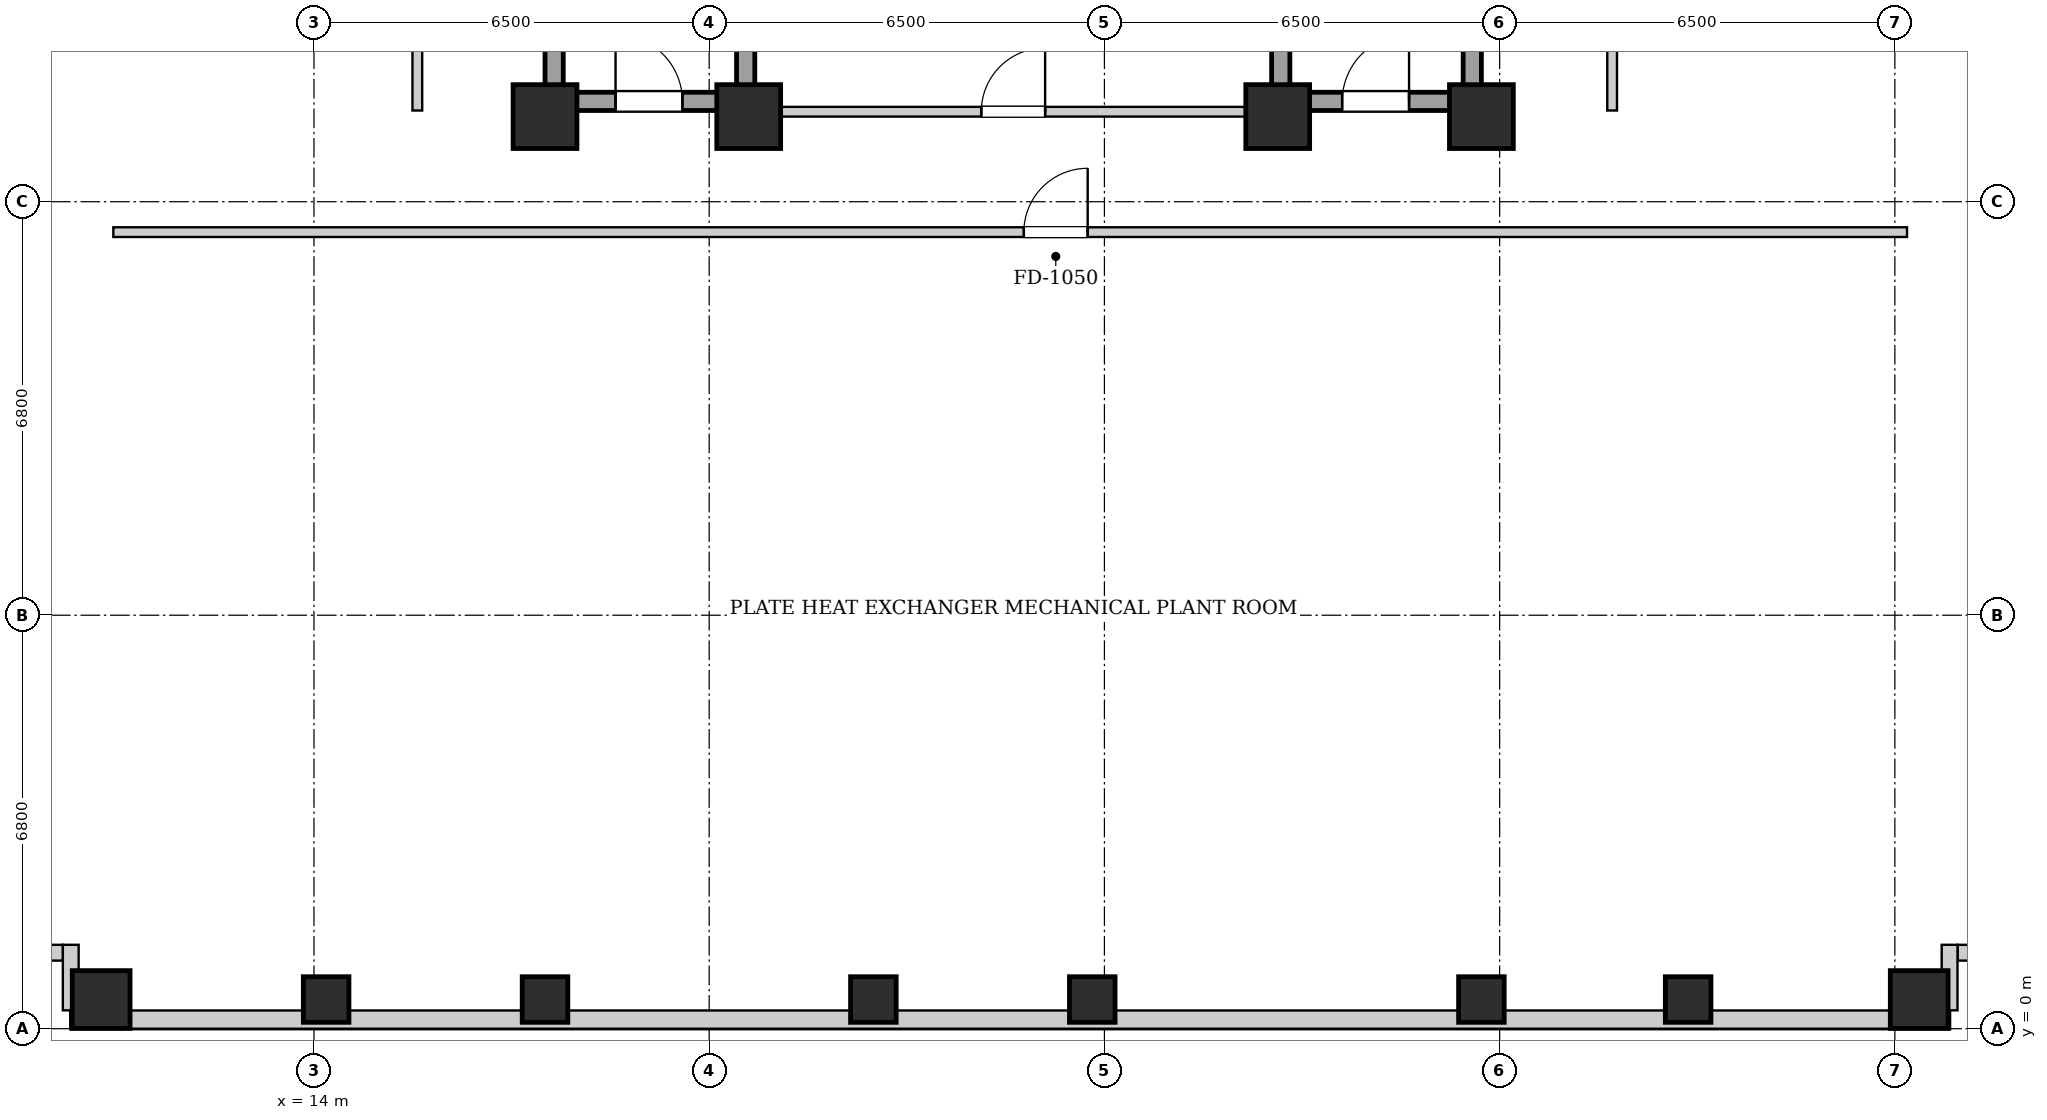
"""IFC4 building model, lengths in metres.
Left out: names, types, materials, properties, quantities, classifications, styles, units other than length and angle.
Written with IfcOpenShell. Run it as: python <this file> out.ifc"""

import sys

from ifc_helpers import new_model, si_unit, direction, frame, frame_2d, origin, origin_2d, place, context, subcontext, project, spatial, rectangle, extrude, element, fill, save


model = new_model("IFC4")
c1 = context("Model", 3, precision=1e-05, world=origin(), true_north=direction((0.0, 1.0)))
c2 = subcontext(c1, "Body", "Model", "MODEL_VIEW")
j1 = project(units=[si_unit("LENGTHUNIT", "METRE"), si_unit("PLANEANGLEUNIT", "RADIAN")], contexts=[c1])
p1 = place(None, origin())
s1 = spatial("IfcSite", under=j1, at=p1, CompositionType="ELEMENT")
p2 = place(p1, origin())
s2 = spatial("IfcBuilding", under=s1, at=p2, CompositionType="ELEMENT")
p3 = place(p2, frame((0.0, 0.0, 119.9)))
s3 = spatial("IfcBuildingStorey", under=s2, at=p3, CompositionType="ELEMENT", Elevation=119.9)
p4 = place(p3, frame((10.5, 0.48, 0.0), z_axis=(0.0, 0.0, 1.0), x_axis=(1.0, 0.0, 0.0)))
e1 = element("IfcColumn", 1, at=p4, inside=s3, PredefinedType="COLUMN", context=c2, shape_type="SweptSolid", body=[
    extrude(rectangle(XDim=0.95, YDim=0.95, at=origin_2d()), origin(), (0.0, 0.0, 1.0), 4.5),
])
for number, where, z_axis, x_axis in (
    (2, (14.2, 0.48, 0.0), (0.0, 0.0, 1.0), (1.0, 0.0, 0.0)),
    (3, (17.8, 0.48, 0.0), (0.0, 0.0, 1.0), (1.0, 0.0, 0.0)),
    (4, (23.2, 0.48, 0.0), (0.0, 0.0, 1.0), (1.0, 0.0, 0.0)),
    (5, (26.8, 0.48, 0.0), (0.0, 0.0, 1.0), (1.0, 0.0, 0.0)),
    (6, (33.2, 0.48, 0.0), (0.0, 0.0, 1.0), (1.0, 0.0, 0.0)),
    (7, (36.6, 0.48, 0.0), (0.0, 0.0, 1.0), (1.0, 0.0, 0.0)),
):
    element("IfcColumn", number, at=place(p3, frame(where, z_axis=z_axis, x_axis=x_axis)), inside=s3, PredefinedType="COLUMN", context=c2, shape_type="SweptSolid", body=[
        extrude(rectangle(XDim=0.75, YDim=0.75, at=origin_2d()), origin(), (0.0, 0.0, 1.0), 4.5),
    ])
p5 = place(p3, frame((40.4, 0.48, 0.0), z_axis=(0.0, 0.0, 1.0), x_axis=(1.0, 0.0, 0.0)))
e8 = element("IfcColumn", 8, at=p5, inside=s3, PredefinedType="COLUMN", context=c2, shape_type="SweptSolid", body=[
    extrude(rectangle(XDim=0.95, YDim=0.95, at=origin_2d()), origin(), (0.0, 0.0, 1.0), 4.5),
])
for number, where, z_axis, x_axis in (
    (9, (17.8, 15.0, 0.0), (0.0, 0.0, 1.0), (1.0, 0.0, 0.0)),
    (10, (21.15, 15.0, 0.0), (0.0, 0.0, 1.0), (1.0, 0.0, 0.0)),
    (11, (29.85, 15.0, 0.0), (0.0, 0.0, 1.0), (1.0, 0.0, 0.0)),
    (12, (33.2, 15.0, 0.0), (0.0, 0.0, 1.0), (1.0, 0.0, 0.0)),
):
    element("IfcColumn", number, at=place(p3, frame(where, z_axis=z_axis, x_axis=x_axis)), inside=s3, PredefinedType="COLUMN", context=c2, shape_type="SweptSolid", body=[
        extrude(rectangle(XDim=1.05, YDim=1.05, at=origin_2d()), origin(), (0.0, 0.0, 1.0), 4.5),
    ])
p6 = place(p3, frame((40.9, 0.15, 0.0), z_axis=(0.0, 0.0, 1.0), x_axis=(-1.0, 0.0, 0.0)))
e13 = element("IfcWall", 13, at=p6, inside=s3, PredefinedType="SOLIDWALL", context=c2, shape_type="SweptSolid", body=[
    extrude(rectangle(XDim=30.9, YDim=0.3, at=frame_2d((15.45, 0.0))), origin(), (0.0, 0.0, 1.0), 1.965),
])
p7 = place(p3, frame((42.018, 1.25, 0.0), z_axis=(0.0, 0.0, 1.0), x_axis=(-1.0, 0.0, 0.0)))
e14 = element("IfcWall", 14, at=p7, inside=s3, PredefinedType="SOLIDWALL", context=c2, shape_type="SweptSolid", body=[
    extrude(rectangle(XDim=0.986, YDim=0.26, at=frame_2d((0.493, 0.0))), origin(), (0.0, 0.0, 1.0), 4.18),
])
for number, where, z_axis, x_axis in (
    (15, (40.9, 1.38, 0.0), (0.0, 0.0, 1.0), (0.0, -1.0, 0.0)),
    (16, (10.0, 0.302, 0.0), (0.0, 0.0, 1.0), (0.0, 1.0, 0.0)),
):
    element("IfcWall", number, at=place(p3, frame(where, z_axis=z_axis, x_axis=x_axis)), inside=s3, PredefinedType="SOLIDWALL", context=c2, shape_type="SweptSolid", body=[
        extrude(rectangle(XDim=1.078, YDim=0.26, at=frame_2d((0.539, 0.0))), origin(), (0.0, 0.0, 1.0), 4.18),
    ])
p8 = place(p3, frame((9.868, 1.25, 0.0), z_axis=(0.0, 0.0, 1.0), x_axis=(-1.0, 0.0, 0.0)))
e17 = element("IfcWall", 17, at=p8, inside=s3, PredefinedType="SOLIDWALL", context=c2, shape_type="SweptSolid", body=[
    extrude(rectangle(XDim=1.248, YDim=0.26, at=frame_2d((0.624, 0.0))), origin(), (0.0, 0.0, 1.0), 4.18),
])
for number, where, z_axis, x_axis in (
    (18, (17.95, 15.1, 0.0), (0.0, 0.0, 1.0), (0.0, 1.0, 0.0)),
    (19, (21.1, 15.1, 0.0), (0.0, 0.0, 1.0), (0.0, 1.0, 0.0)),
):
    element("IfcWall", number, at=place(p3, frame(where, z_axis=z_axis, x_axis=x_axis)), inside=s3, PredefinedType="SHEAR", context=c2, shape_type="SweptSolid", body=[
        extrude(rectangle(XDim=9.0, YDim=0.3, at=frame_2d((4.5, 0.0))), origin(), (0.0, 0.0, 1.0), 4.18),
    ])
p9 = place(p3, frame((18.1, 15.25, 0.0), z_axis=(0.0, 0.0, 1.0), x_axis=(1.0, 0.0, 0.0)))
e20 = element("IfcWall", 20, at=p9, inside=s3, PredefinedType="SHEAR", context=c2, shape_type="SweptSolid", body=[
    extrude(rectangle(XDim=2.85, YDim=0.3, at=frame_2d((1.425, 0.0))), origin(), (0.0, 0.0, 1.0), 4.18),
])
p10 = place(p9, frame((0.86, 0.0, 0.0)))
e21 = element("IfcOpeningElement", 21, at=p10, cuts=e20, PredefinedType="OPENING", context=c2, shape_type="SweptSolid", body=[
    extrude(rectangle(XDim=1.1, YDim=2.05, at=frame_2d((0.55, 1.025))), frame((0.0, 0.16, 0.0), z_axis=(0.0, -1.0, 0.0), x_axis=(1.0, 0.0, 0.0)), (0.0, 0.0, 1.0), 0.32),
])
for number, where, z_axis, x_axis in (
    (22, (29.9, 15.1, 0.0), (0.0, 0.0, 1.0), (0.0, 1.0, 0.0)),
    (23, (33.05, 15.1, 0.0), (0.0, 0.0, 1.0), (0.0, 1.0, 0.0)),
):
    element("IfcWall", number, at=place(p3, frame(where, z_axis=z_axis, x_axis=x_axis)), inside=s3, PredefinedType="SHEAR", context=c2, shape_type="SweptSolid", body=[
        extrude(rectangle(XDim=9.0, YDim=0.3, at=frame_2d((4.5, 0.0))), origin(), (0.0, 0.0, 1.0), 4.18),
    ])
p11 = place(p3, frame((30.05, 15.25, 0.0), z_axis=(0.0, 0.0, 1.0), x_axis=(1.0, 0.0, 0.0)))
e24 = element("IfcWall", 24, at=p11, inside=s3, PredefinedType="SHEAR", context=c2, shape_type="SweptSolid", body=[
    extrude(rectangle(XDim=2.85, YDim=0.3, at=frame_2d((1.425, 0.0))), origin(), (0.0, 0.0, 1.0), 4.18),
])
p12 = place(p11, frame((0.86, 0.0, 0.0)))
e25 = element("IfcOpeningElement", 25, at=p12, cuts=e24, PredefinedType="OPENING", context=c2, shape_type="SweptSolid", body=[
    extrude(rectangle(XDim=1.1, YDim=2.05, at=frame_2d((0.55, 1.025))), frame((0.0, 0.16, 0.0), z_axis=(0.0, -1.0, 0.0), x_axis=(1.0, 0.0, 0.0)), (0.0, 0.0, 1.0), 0.32),
])
p13 = place(p3, frame((21.25, 15.08, 0.0), z_axis=(0.0, 0.0, 1.0), x_axis=(1.0, 0.0, 0.0)))
e26 = element("IfcWall", 26, at=p13, inside=s3, PredefinedType="PARTITIONING", context=c2, shape_type="SweptSolid", body=[
    extrude(rectangle(XDim=8.5, YDim=0.16, at=frame_2d((4.25, 0.0))), origin(), (0.0, 0.0, 1.0), 4.18),
])
p14 = place(p13, frame((3.725, 0.0, 0.0)))
e27 = element("IfcOpeningElement", 27, at=p14, cuts=e26, PredefinedType="OPENING", context=c2, shape_type="SweptSolid", body=[
    extrude(rectangle(XDim=1.05, YDim=2.05, at=frame_2d((0.525, 1.025))), frame((0.0, 0.09, 0.0), z_axis=(0.0, -1.0, 0.0), x_axis=(1.0, 0.0, 0.0)), (0.0, 0.0, 1.0), 0.18),
])
p15 = place(p3, frame((10.7, 13.1, 0.0), z_axis=(0.0, 0.0, 1.0), x_axis=(1.0, 0.0, 0.0)))
e28 = element("IfcWall", 28, at=p15, inside=s3, PredefinedType="PARTITIONING", context=c2, shape_type="SweptSolid", body=[
    extrude(rectangle(XDim=29.5, YDim=0.16, at=frame_2d((14.75, 0.0))), origin(), (0.0, 0.0, 1.0), 4.18),
])
p16 = place(p15, frame((14.975, 0.0, 0.0)))
e29 = element("IfcOpeningElement", 29, at=p16, cuts=e28, PredefinedType="OPENING", context=c2, shape_type="SweptSolid", body=[
    extrude(rectangle(XDim=1.05, YDim=2.05, at=frame_2d((0.525, 1.025))), frame((0.0, 0.09, 0.0), z_axis=(0.0, -1.0, 0.0), x_axis=(1.0, 0.0, 0.0)), (0.0, 0.0, 1.0), 0.18),
])
p17 = place(p3, frame((15.7, 15.1, 0.0), z_axis=(0.0, 0.0, 1.0), x_axis=(0.0, 1.0, 0.0)))
e30 = element("IfcWall", 30, at=p17, inside=s3, PredefinedType="PARTITIONING", context=c2, shape_type="SweptSolid", body=[
    extrude(rectangle(XDim=13.8, YDim=0.16, at=frame_2d((6.9, 0.0))), origin(), (0.0, 0.0, 1.0), 4.18),
])
p18 = place(p17, frame((6.475, 0.0, 0.0)))
e31 = element("IfcOpeningElement", 31, at=p18, cuts=e30, PredefinedType="OPENING", context=c2, shape_type="SweptSolid", body=[
    extrude(rectangle(XDim=1.05, YDim=2.05, at=frame_2d((0.525, 1.025))), frame((0.0, 0.09, 0.0), z_axis=(0.0, -1.0, 0.0), x_axis=(1.0, 0.0, 0.0)), (0.0, 0.0, 1.0), 0.18),
])
p19 = place(p3, frame((35.35, 15.1, 0.0), z_axis=(0.0, 0.0, 1.0), x_axis=(0.0, 1.0, 0.0)))
e32 = element("IfcWall", 32, at=p19, inside=s3, PredefinedType="PARTITIONING", context=c2, shape_type="SweptSolid", body=[
    extrude(rectangle(XDim=13.8, YDim=0.16, at=frame_2d((6.9, 0.0))), origin(), (0.0, 0.0, 1.0), 4.18),
])
p20 = place(p19, frame((6.475, 0.0, 0.0)))
e33 = element("IfcOpeningElement", 33, at=p20, cuts=e32, PredefinedType="OPENING", context=c2, shape_type="SweptSolid", body=[
    extrude(rectangle(XDim=1.05, YDim=2.05, at=frame_2d((0.525, 1.025))), frame((0.0, 0.09, 0.0), z_axis=(0.0, -1.0, 0.0), x_axis=(1.0, 0.0, 0.0)), (0.0, 0.0, 1.0), 0.18),
])
p21 = place(p10, origin())
e34 = element("IfcDoor", 34, at=p21, inside=s3, OperationType="SINGLE_SWING_LEFT", PredefinedType="DOOR", context=c2, shape_type="SweptSolid", body=[
    extrude(rectangle(XDim=1.1, YDim=2.05, at=frame_2d((0.55, 1.025))), frame((0.0, 0.025, 0.0), z_axis=(0.0, -1.0, 0.0), x_axis=(1.0, 0.0, 0.0)), (0.0, 0.0, 1.0), 0.05),
])
fill(e21, e34)
p22 = place(p12, origin())
e35 = element("IfcDoor", 35, at=p22, inside=s3, OperationType="SINGLE_SWING_RIGHT", PredefinedType="DOOR", context=c2, shape_type="SweptSolid", body=[
    extrude(rectangle(XDim=1.1, YDim=2.05, at=frame_2d((0.55, 1.025))), frame((0.0, 0.025, 0.0), z_axis=(0.0, -1.0, 0.0), x_axis=(1.0, 0.0, 0.0)), (0.0, 0.0, 1.0), 0.05),
])
fill(e25, e35)
p23 = place(p14, origin())
e36 = element("IfcDoor", 36, at=p23, inside=s3, OperationType="SINGLE_SWING_RIGHT", PredefinedType="DOOR", context=c2, shape_type="SweptSolid", body=[
    extrude(rectangle(XDim=1.05, YDim=2.05, at=frame_2d((0.525, 1.025))), frame((0.0, 0.025, 0.0), z_axis=(0.0, -1.0, 0.0), x_axis=(1.0, 0.0, 0.0)), (0.0, 0.0, 1.0), 0.05),
])
fill(e27, e36)
p24 = place(p16, origin())
e37 = element("IfcDoor", 37, at=p24, inside=s3, OperationType="SINGLE_SWING_RIGHT", PredefinedType="DOOR", context=c2, shape_type="SweptSolid", body=[
    extrude(rectangle(XDim=1.05, YDim=2.05, at=frame_2d((0.525, 1.025))), frame((0.0, 0.025, 0.0), z_axis=(0.0, -1.0, 0.0), x_axis=(1.0, 0.0, 0.0)), (0.0, 0.0, 1.0), 0.05),
])
fill(e29, e37)
save(model, sys.argv[1])
